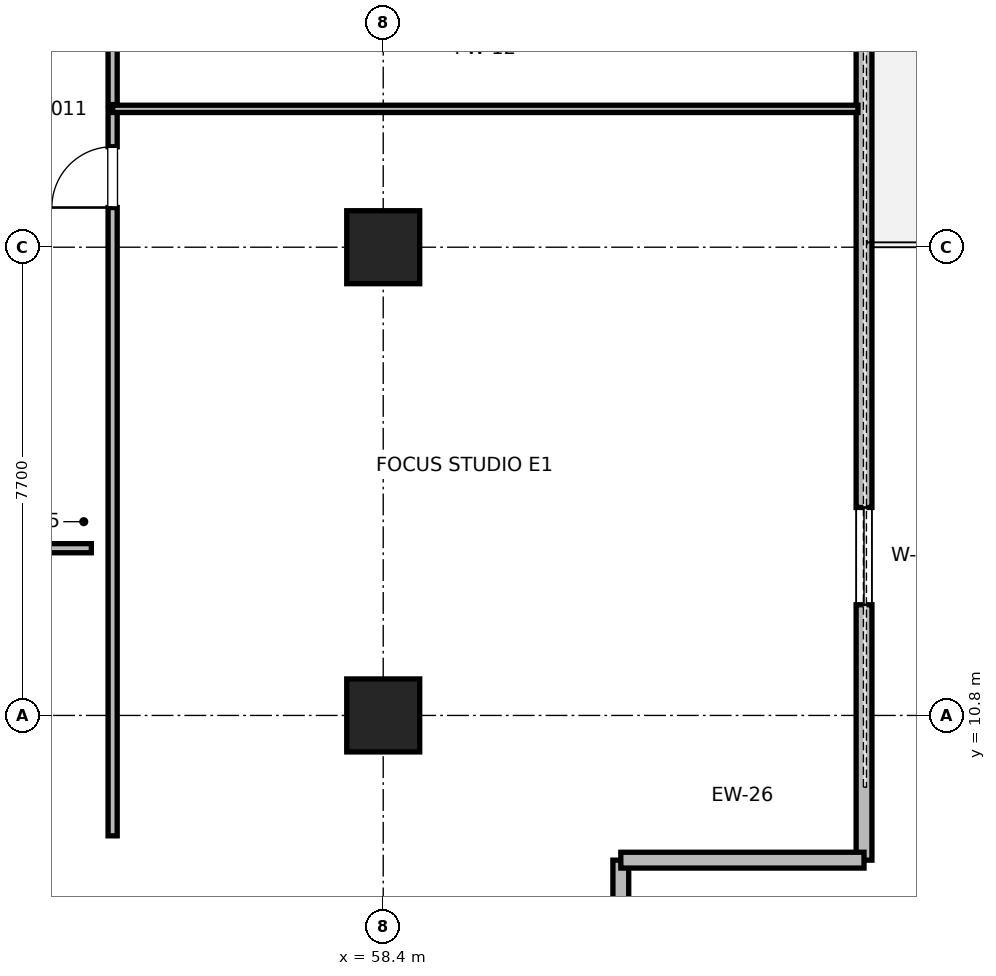
"""IFC4 building model, lengths in metres.
Left out: names, types, materials, properties, quantities, classifications, styles, units other than length and angle.
Written with IfcOpenShell. Run it as: python <this file> out.ifc"""

import sys

from ifc_helpers import new_model, si_unit, direction, frame, frame_2d, origin, origin_2d, place, context, subcontext, project, spatial, rectangle, extrude, element, fill, save


model = new_model("IFC4")
c1 = context("Model", 3, precision=1e-05, world=origin(), true_north=direction((0.0, 1.0)))
c2 = subcontext(c1, "Body", "Model", "MODEL_VIEW")
j1 = project(units=[si_unit("LENGTHUNIT", "METRE"), si_unit("PLANEANGLEUNIT", "RADIAN")], contexts=[c1])
p1 = place(None, origin())
s1 = spatial("IfcSite", under=j1, at=p1, CompositionType="ELEMENT")
p2 = place(p1, origin())
s2 = spatial("IfcBuilding", under=s1, at=p2, CompositionType="ELEMENT")
p3 = place(p2, frame((0.0, 0.0, 263.2)))
s3 = spatial("IfcBuildingStorey", under=s2, at=p3, CompositionType="ELEMENT", Elevation=263.2)
for number, where, z_axis, x_axis in (
    (1, (58.4, 18.5, 0.0), (0.0, 0.0, 1.0), (1.0, 0.0, 0.0)),
    (2, (58.4, 10.8, 0.0), (0.0, 0.0, 1.0), (1.0, 0.0, 0.0)),
):
    element("IfcColumn", number, at=place(p3, frame(where, z_axis=z_axis, x_axis=x_axis)), inside=s3, PredefinedType="COLUMN", context=c2, shape_type="SweptSolid", body=[
        extrude(rectangle(XDim=1.2, YDim=1.2, at=origin_2d()), origin(), (0.0, 0.0, 1.0), 4.0),
    ])
p4 = place(p3, frame((66.308, 8.42, 0.0), z_axis=(0.0, 0.0, 1.0), x_axis=(0.0, 1.0, 0.0)))
e3 = element("IfcWall", 3, at=p4, inside=s3, PredefinedType="PARAPET", context=c2, shape_type="SweptSolid", body=[
    extrude(rectangle(XDim=38.16, YDim=0.26, at=frame_2d((19.08, 0.0))), origin(), (0.0, 0.0, 1.0), 3.123),
])
p5 = place(p4, frame((4.2, 0.0, 0.85)))
e4 = element("IfcOpeningElement", 4, at=p5, cuts=e3, PredefinedType="OPENING", context=c2, shape_type="SweptSolid", body=[
    extrude(rectangle(XDim=1.6, YDim=2.1, at=frame_2d((0.8, 1.05))), frame((0.0, 0.13, 0.0), z_axis=(0.0, -1.0, 0.0), x_axis=(1.0, 0.0, 0.0)), (0.0, 0.0, 1.0), 0.26),
])
p6 = place(p4, frame((18.48, 0.0, 0.0)))
e5 = element("IfcOpeningElement", 5, at=p6, cuts=e3, PredefinedType="OPENING", context=c2, shape_type="SweptSolid", body=[
    extrude(rectangle(XDim=1.2, YDim=2.2, at=frame_2d((0.6, 1.1))), frame((0.0, 0.13, 0.0), z_axis=(0.0, -1.0, 0.0), x_axis=(1.0, 0.0, 0.0)), (0.0, 0.0, 1.0), 0.26),
])
p7 = place(p4, frame((32.36, 0.0, 0.85)))
e6 = element("IfcOpeningElement", 6, at=p7, cuts=e3, PredefinedType="OPENING", context=c2, shape_type="SweptSolid", body=[
    extrude(rectangle(XDim=1.6, YDim=2.1, at=frame_2d((0.8, 1.05))), frame((0.0, 0.13, 0.0), z_axis=(0.0, -1.0, 0.0), x_axis=(1.0, 0.0, 0.0)), (0.0, 0.0, 1.0), 0.26),
])
p8 = place(p3, frame((62.308, 4.92, 0.0), z_axis=(0.0, 0.0, 1.0), x_axis=(0.0, 1.0, 0.0)))
e7 = element("IfcWall", 7, at=p8, inside=s3, PredefinedType="PARAPET", context=c2, shape_type="SweptSolid", body=[
    extrude(rectangle(XDim=3.5, YDim=0.26, at=frame_2d((1.75, 0.0))), origin(), (0.0, 0.0, 1.0), 3.785),
])
p9 = place(p8, frame((1.05, 0.0, 0.85)))
e8 = element("IfcOpeningElement", 8, at=p9, cuts=e7, PredefinedType="OPENING", context=c2, shape_type="SweptSolid", body=[
    extrude(rectangle(XDim=1.4, YDim=2.0, at=frame_2d((0.7, 1.0))), frame((0.0, 0.13, 0.0), z_axis=(0.0, -1.0, 0.0), x_axis=(1.0, 0.0, 0.0)), (0.0, 0.0, 1.0), 0.26),
])
p10 = place(p3, frame((62.308, 8.42, 0.0), z_axis=(0.0, 0.0, 1.0), x_axis=(1.0, 0.0, 0.0)))
e9 = element("IfcWall", 9, at=p10, inside=s3, PredefinedType="PARAPET", context=c2, shape_type="SweptSolid", body=[
    extrude(rectangle(XDim=4.0, YDim=0.26, at=frame_2d((2.0, 0.0))), origin(), (0.0, 0.0, 1.0), 3.785),
])
p11 = place(p3, frame((26.4, 13.55, 0.0), z_axis=(0.0, 0.0, 1.0), x_axis=(1.0, 0.0, 0.0)))
e10 = element("IfcWall", 10, at=p11, inside=s3, PredefinedType="PARTITIONING", context=c2, shape_type="SweptSolid", body=[
    extrude(rectangle(XDim=27.2, YDim=0.15, at=frame_2d((13.6, 0.0))), origin(), (0.0, 0.0, 1.0), 2.85),
])
p12 = place(p11, frame((13.075, 0.0, 0.0)))
e11 = element("IfcOpeningElement", 11, at=p12, cuts=e10, PredefinedType="OPENING", context=c2, shape_type="SweptSolid", body=[
    extrude(rectangle(XDim=1.05, YDim=2.2, at=frame_2d((0.525, 1.1))), frame((0.0, 0.075, 0.0), z_axis=(0.0, -1.0, 0.0), x_axis=(1.0, 0.0, 0.0)), (0.0, 0.0, 1.0), 0.15),
])
p13 = place(p3, frame((53.95, 8.82, 0.0), z_axis=(0.0, 0.0, 1.0), x_axis=(0.0, 1.0, 0.0)))
e12 = element("IfcWall", 12, at=p13, inside=s3, PredefinedType="PARTITIONING", context=c2, shape_type="SweptSolid", body=[
    extrude(rectangle(XDim=11.955, YDim=0.15, at=frame_2d((5.978, 0.0))), origin(), (0.0, 0.0, 1.0), 2.85),
])
p14 = place(p13, frame((10.333, 0.0, 0.0)))
e13 = element("IfcOpeningElement", 13, at=p14, cuts=e12, PredefinedType="OPENING", context=c2, shape_type="SweptSolid", body=[
    extrude(rectangle(XDim=1.0, YDim=2.15, at=frame_2d((0.5, 1.075))), frame((0.0, 0.075, 0.0), z_axis=(0.0, -1.0, 0.0), x_axis=(1.0, 0.0, 0.0)), (0.0, 0.0, 1.0), 0.15),
])
p15 = place(p3, frame((53.95, 20.775, 0.0), z_axis=(0.0, 0.0, 1.0), x_axis=(1.0, 0.0, 0.0)))
e14 = element("IfcWall", 14, at=p15, inside=s3, PredefinedType="PARTITIONING", context=c2, shape_type="SweptSolid", body=[
    extrude(rectangle(XDim=12.258, YDim=0.12, at=frame_2d((6.129, 0.0))), origin(), (0.0, 0.0, 1.0), 2.85),
])
p16 = place(p3, frame((53.95, 20.845, 0.0), z_axis=(0.0, 0.0, 1.0), x_axis=(0.0, 1.0, 0.0)))
e15 = element("IfcWall", 15, at=p16, inside=s3, PredefinedType="PARTITIONING", context=c2, shape_type="SweptSolid", body=[
    extrude(rectangle(XDim=12.632, YDim=0.15, at=frame_2d((6.316, 0.0))), origin(), (0.0, 0.0, 1.0), 2.85),
])
p17 = place(p16, frame((5.781, 0.0, 0.0)))
e16 = element("IfcOpeningElement", 16, at=p17, cuts=e15, PredefinedType="OPENING", context=c2, shape_type="SweptSolid", body=[
    extrude(rectangle(XDim=1.0, YDim=2.15, at=frame_2d((0.5, 1.075))), frame((0.0, 0.075, 0.0), z_axis=(0.0, -1.0, 0.0), x_axis=(1.0, 0.0, 0.0)), (0.0, 0.0, 1.0), 0.15),
])
p18 = place(p5, origin())
e17 = element("IfcWindow", 17, at=p18, inside=s3, PartitioningType="SINGLE_PANEL", PredefinedType="WINDOW", context=c2, shape_type="SweptSolid", body=[
    extrude(rectangle(XDim=1.6, YDim=2.1, at=frame_2d((0.8, 1.05))), frame((0.0, 0.03, 0.0), z_axis=(0.0, -1.0, 0.0), x_axis=(1.0, 0.0, 0.0)), (0.0, 0.0, 1.0), 0.06),
])
fill(e4, e17)
p19 = place(p14, origin())
e18 = element("IfcDoor", 18, at=p19, inside=s3, OperationType="SINGLE_SWING_LEFT", PredefinedType="DOOR", context=c2, shape_type="SweptSolid", body=[
    extrude(rectangle(XDim=1.0, YDim=2.15, at=frame_2d((0.5, 1.075))), frame((0.0, 0.025, 0.0), z_axis=(0.0, -1.0, 0.0), x_axis=(1.0, 0.0, 0.0)), (0.0, 0.0, 1.0), 0.05),
])
fill(e13, e18)
save(model, sys.argv[1])
